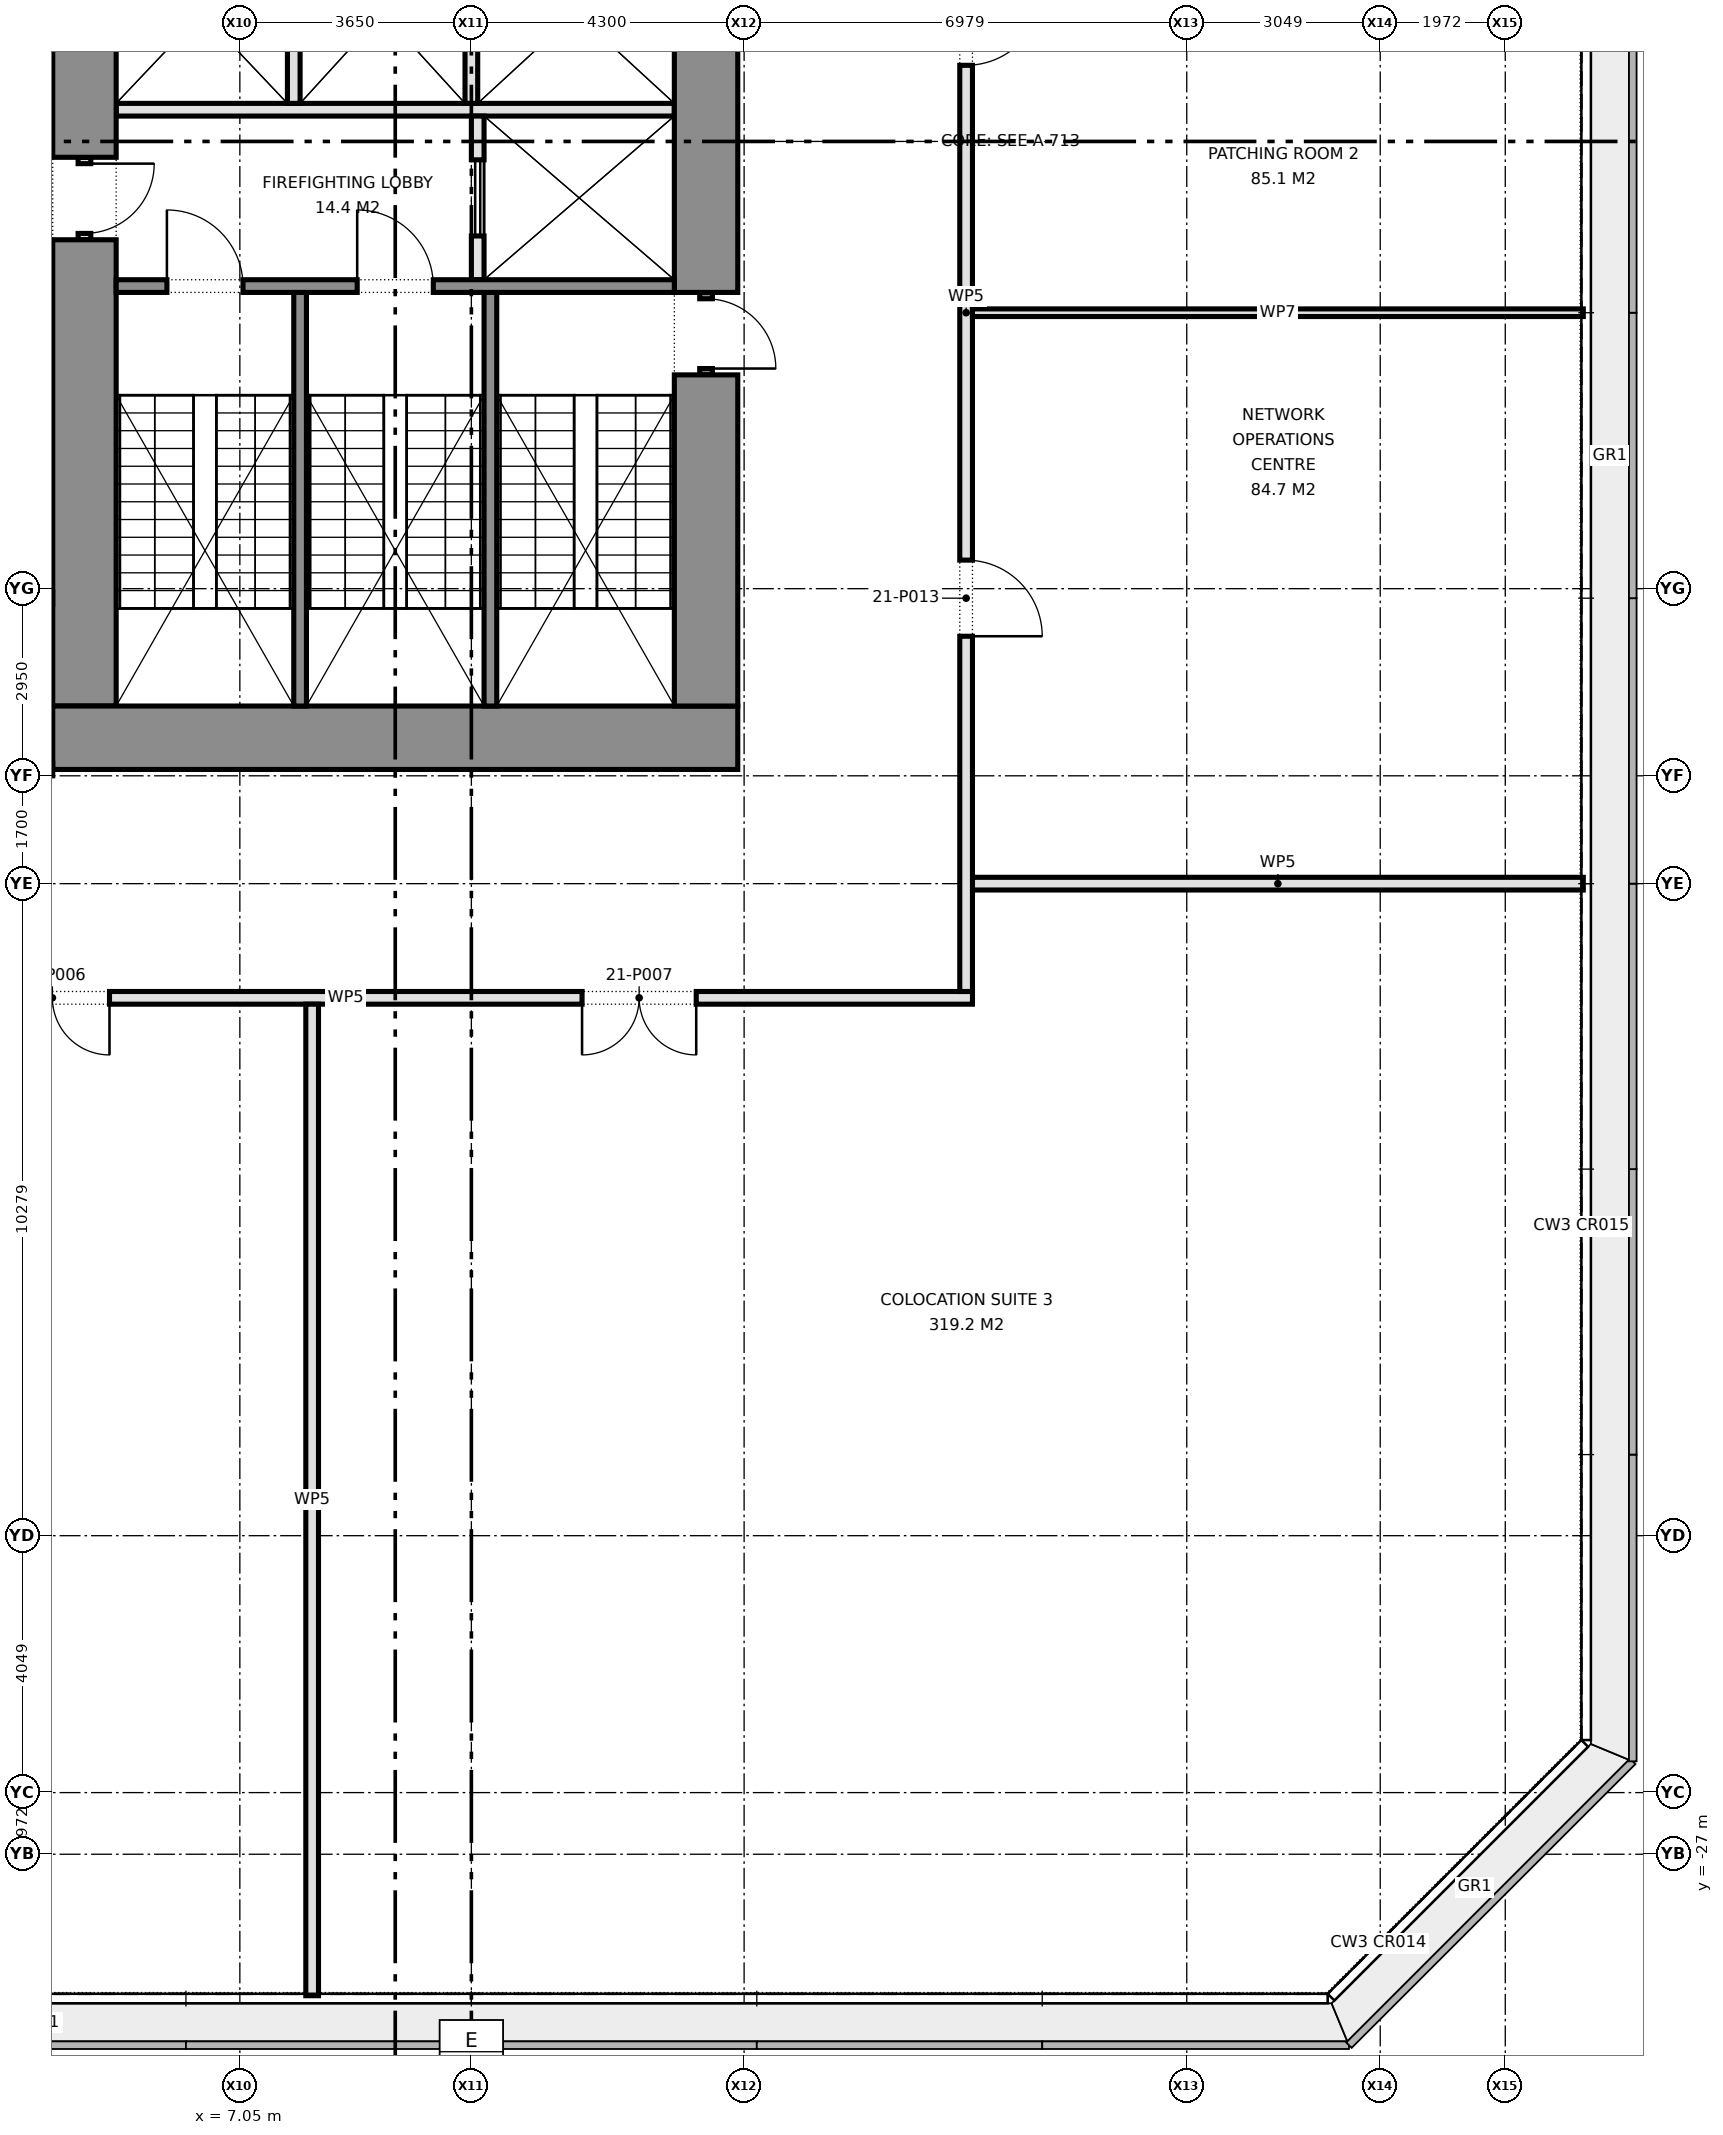
"""IFC4 building model, lengths in metres.
Left out: names, types, materials, properties, quantities, classifications, styles, units other than length and angle.
Written with IfcOpenShell. Run it as: python <this file> out.ifc"""

import sys

from ifc_helpers import new_model, si_unit, direction, frame, frame_2d, origin, place, context, subcontext, project, spatial, rectangle, extrude, element, fill, save


model = new_model("IFC4")
c1 = context("Model", 3, precision=1e-05, world=origin(), true_north=direction((0.0, 1.0)))
c2 = subcontext(c1, "Body", "Model", "MODEL_VIEW")
j1 = project(units=[si_unit("LENGTHUNIT", "METRE"), si_unit("PLANEANGLEUNIT", "RADIAN")], contexts=[c1])
p1 = place(None, origin())
s1 = spatial("IfcSite", under=j1, at=p1, CompositionType="ELEMENT")
p2 = place(p1, origin())
s2 = spatial("IfcBuilding", under=s1, at=p2, CompositionType="ELEMENT")
p3 = place(p2, frame((0.0, 0.0, 95.2)))
s3 = spatial("IfcBuildingStorey", under=s2, at=p3, CompositionType="ELEMENT", Elevation=95.2)
p4 = place(p3, frame((14.9, -9.4, 0.0), z_axis=(0.0, 0.0, 1.0), x_axis=(-1.0, 0.0, 0.0)))
e1 = element("IfcWall", 1, at=p4, inside=s3, PredefinedType="SHEAR", context=c2, shape_type="SweptSolid", body=[
    extrude(rectangle(XDim=10.8, YDim=1.0, at=frame_2d((5.4, 0.0))), origin(), (0.0, 0.0, 1.0), 4.2),
])
p5 = place(p3, frame((14.4, 3.75, 0.0), z_axis=(0.0, 0.0, 1.0), x_axis=(0.0, -1.0, 0.0)))
e2 = element("IfcWall", 2, at=p5, inside=s3, PredefinedType="SHEAR", context=c2, shape_type="SweptSolid", body=[
    extrude(rectangle(XDim=6.13, YDim=1.0, at=frame_2d((3.065, 0.0))), origin(), (0.0, 0.0, 1.0), 4.2),
])
p6 = place(p3, frame((14.4, -2.38, 0.0), z_axis=(0.0, 0.0, 1.0), x_axis=(0.0, -1.0, 0.0)))
e3 = element("IfcWall", 3, at=p6, inside=s3, PredefinedType="SHEAR", context=c2, shape_type="SweptSolid", body=[
    extrude(rectangle(XDim=1.3, YDim=0.2, at=frame_2d((0.65, 0.0))), origin(), (0.0, 0.0, 1.0), 2.4),
])
p7 = place(p6, frame((0.1, 0.0, 0.0)))
e4 = element("IfcOpeningElement", 4, at=p7, cuts=e3, PredefinedType="OPENING", context=c2, shape_type="SweptSolid", body=[
    extrude(rectangle(XDim=1.1, YDim=2.1, at=frame_2d((0.55, 1.05))), frame((0.0, 0.11, 0.0), z_axis=(0.0, -1.0, 0.0), x_axis=(1.0, 0.0, 0.0)), (0.0, 0.0, 1.0), 0.22),
])
p8 = place(p3, frame((14.4, -3.68, 0.0), z_axis=(0.0, 0.0, 1.0), x_axis=(0.0, -1.0, 0.0)))
e5 = element("IfcWall", 5, at=p8, inside=s3, PredefinedType="SHEAR", context=c2, shape_type="SweptSolid", body=[
    extrude(rectangle(XDim=5.22, YDim=1.0, at=frame_2d((2.61, 0.0))), origin(), (0.0, 0.0, 1.0), 4.2),
])
p9 = place(p3, frame((4.6, 3.75, 0.0), z_axis=(0.0, 0.0, 1.0), x_axis=(0.0, -1.0, 0.0)))
e6 = element("IfcWall", 6, at=p9, inside=s3, PredefinedType="SHEAR", context=c2, shape_type="SweptSolid", body=[
    extrude(rectangle(XDim=4.0, YDim=1.0, at=frame_2d((2.0, 0.0))), origin(), (0.0, 0.0, 1.0), 4.2),
])
p10 = place(p3, frame((4.6, -0.25, 0.0), z_axis=(0.0, 0.0, 1.0), x_axis=(0.0, -1.0, 0.0)))
e7 = element("IfcWall", 7, at=p10, inside=s3, PredefinedType="PARTITIONING", context=c2, shape_type="SweptSolid", body=[
    extrude(rectangle(XDim=1.3, YDim=0.2, at=frame_2d((0.65, 0.0))), origin(), (0.0, 0.0, 1.0), 2.4),
])
p11 = place(p10, frame((0.1, 0.0, 0.0)))
e8 = element("IfcOpeningElement", 8, at=p11, cuts=e7, PredefinedType="OPENING", context=c2, shape_type="SweptSolid", body=[
    extrude(rectangle(XDim=1.1, YDim=2.1, at=frame_2d((0.55, 1.05))), frame((0.0, 0.11, 0.0), z_axis=(0.0, -1.0, 0.0), x_axis=(1.0, 0.0, 0.0)), (0.0, 0.0, 1.0), 0.22),
])
p12 = place(p3, frame((4.6, -1.55, 0.0), z_axis=(0.0, 0.0, 1.0), x_axis=(0.0, -1.0, 0.0)))
e9 = element("IfcWall", 9, at=p12, inside=s3, PredefinedType="SHEAR", context=c2, shape_type="SweptSolid", body=[
    extrude(rectangle(XDim=7.35, YDim=1.0, at=frame_2d((3.675, 0.0))), origin(), (0.0, 0.0, 1.0), 4.2),
])
p13 = place(p3, frame((13.9, 0.5, 0.0), z_axis=(0.0, 0.0, 1.0), x_axis=(-1.0, 0.0, 0.0)))
e10 = element("IfcWall", 10, at=p13, inside=s3, PredefinedType="PARTITIONING", context=c2, shape_type="SweptSolid", body=[
    extrude(rectangle(XDim=8.8, YDim=0.2, at=frame_2d((4.4, 0.0))), origin(), (0.0, 0.0, 1.0), 4.2),
])
p14 = place(p3, frame((10.8, 0.4, 0.0), z_axis=(0.0, 0.0, 1.0), x_axis=(0.0, -1.0, 0.0)))
e11 = element("IfcWall", 11, at=p14, inside=s3, PredefinedType="PARTITIONING", context=c2, shape_type="SweptSolid", body=[
    extrude(rectangle(XDim=2.58, YDim=0.2, at=frame_2d((1.29, 0.0))), origin(), (0.0, 0.0, 1.0), 4.2),
])
p15 = place(p14, frame((0.69, 0.0, 0.0)))
e12 = element("IfcOpeningElement", 12, at=p15, cuts=e11, PredefinedType="OPENING", context=c2, shape_type="SweptSolid", body=[
    extrude(rectangle(XDim=1.2, YDim=2.1, at=frame_2d((0.6, 1.05))), frame((0.0, 0.11, 0.0), z_axis=(0.0, -1.0, 0.0), x_axis=(1.0, 0.0, 0.0)), (0.0, 0.0, 1.0), 0.22),
])
p16 = place(p3, frame((13.9, -2.28, 0.0), z_axis=(0.0, 0.0, 1.0), x_axis=(-1.0, 0.0, 0.0)))
e13 = element("IfcWall", 13, at=p16, inside=s3, PredefinedType="SHEAR", context=c2, shape_type="SweptSolid", body=[
    extrude(rectangle(XDim=8.8, YDim=0.2, at=frame_2d((4.4, 0.0))), origin(), (0.0, 0.0, 1.0), 4.2),
])
p17 = place(p16, frame((3.8, 0.0, 0.0)))
e14 = element("IfcOpeningElement", 14, at=p17, cuts=e13, PredefinedType="OPENING", context=c2, shape_type="SweptSolid", body=[
    extrude(rectangle(XDim=1.2, YDim=2.1, at=frame_2d((0.6, 1.05))), frame((0.0, 0.11, 0.0), z_axis=(0.0, -1.0, 0.0), x_axis=(1.0, 0.0, 0.0)), (0.0, 0.0, 1.0), 0.22),
])
p18 = place(p16, frame((6.8, 0.0, 0.0)))
e15 = element("IfcOpeningElement", 15, at=p18, cuts=e13, PredefinedType="OPENING", context=c2, shape_type="SweptSolid", body=[
    extrude(rectangle(XDim=1.2, YDim=2.1, at=frame_2d((0.6, 1.05))), frame((0.0, 0.11, 0.0), z_axis=(0.0, -1.0, 0.0), x_axis=(1.0, 0.0, 0.0)), (0.0, 0.0, 1.0), 0.22),
])
for number, where, z_axis, x_axis in (
    (16, (11.0, -2.38, 0.0), (0.0, 0.0, 1.0), (0.0, -1.0, 0.0)),
    (17, (8.0, -2.38, 0.0), (0.0, 0.0, 1.0), (0.0, -1.0, 0.0)),
):
    element("IfcWall", number, at=place(p3, frame(where, z_axis=z_axis, x_axis=x_axis)), inside=s3, PredefinedType="SHEAR", context=c2, shape_type="SweptSolid", body=[
        extrude(rectangle(XDim=6.52, YDim=0.2, at=frame_2d((3.26, 0.0))), origin(), (0.0, 0.0, 1.0), 4.2),
    ])
for number, where, z_axis, x_axis in (
    (18, (10.7, 3.45, 0.0), (0.0, 0.0, 1.0), (0.0, -1.0, 0.0)),
    (19, (7.9, 3.45, 0.0), (0.0, 0.0, 1.0), (0.0, -1.0, 0.0)),
):
    element("IfcWall", number, at=place(p3, frame(where, z_axis=z_axis, x_axis=x_axis)), inside=s3, PredefinedType="PARTITIONING", context=c2, shape_type="SweptSolid", body=[
        extrude(rectangle(XDim=2.85, YDim=0.2, at=frame_2d((1.425, 0.0))), origin(), (0.0, 0.0, 1.0), 4.2),
    ])
p19 = place(p3, frame((-18.6, -13.5, 0.0), z_axis=(0.0, 0.0, 1.0), x_axis=(1.0, 0.0, 0.0)))
e20 = element("IfcWall", 20, at=p19, inside=s3, PredefinedType="PARTITIONING", context=c2, shape_type="SweptSolid", body=[
    extrude(rectangle(XDim=37.2, YDim=0.2, at=frame_2d((18.6, 0.0))), origin(), (0.0, 0.0, 1.0), 4.2),
])
p20 = place(p19, frame((2.55, 0.0, 0.0)))
e21 = element("IfcOpeningElement", 21, at=p20, cuts=e20, PredefinedType="OPENING", context=c2, shape_type="SweptSolid", body=[
    extrude(rectangle(XDim=1.8, YDim=2.1, at=frame_2d((0.9, 1.05))), frame((0.0, 0.11, 0.0), z_axis=(0.0, -1.0, 0.0), x_axis=(1.0, 0.0, 0.0)), (0.0, 0.0, 1.0), 0.22),
])
p21 = place(p19, frame((21.795, 0.0, 0.0)))
e22 = element("IfcOpeningElement", 22, at=p21, cuts=e20, PredefinedType="OPENING", context=c2, shape_type="SweptSolid", body=[
    extrude(rectangle(XDim=1.8, YDim=2.1, at=frame_2d((0.9, 1.05))), frame((0.0, 0.11, 0.0), z_axis=(0.0, -1.0, 0.0), x_axis=(1.0, 0.0, 0.0)), (0.0, 0.0, 1.0), 0.22),
])
p22 = place(p19, frame((31.045, 0.0, 0.0)))
e23 = element("IfcOpeningElement", 23, at=p22, cuts=e20, PredefinedType="OPENING", context=c2, shape_type="SweptSolid", body=[
    extrude(rectangle(XDim=1.8, YDim=2.1, at=frame_2d((0.9, 1.05))), frame((0.0, 0.11, 0.0), z_axis=(0.0, -1.0, 0.0), x_axis=(1.0, 0.0, 0.0)), (0.0, 0.0, 1.0), 0.22),
])
p23 = place(p19, frame((8.0, 0.0, 0.0)))
e24 = element("IfcOpeningElement", 24, at=p23, cuts=e20, PredefinedType="OPENING", context=c2, shape_type="SweptSolid", body=[
    extrude(rectangle(XDim=1.2, YDim=2.1, at=frame_2d((0.6, 1.05))), frame((0.0, 0.11, 0.0), z_axis=(0.0, -1.0, 0.0), x_axis=(1.0, 0.0, 0.0)), (0.0, 0.0, 1.0), 0.22),
])
p24 = place(p19, frame((11.4, 0.0, 0.0)))
e25 = element("IfcOpeningElement", 25, at=p24, cuts=e20, PredefinedType="OPENING", context=c2, shape_type="SweptSolid", body=[
    extrude(rectangle(XDim=1.0, YDim=2.1, at=frame_2d((0.5, 1.05))), frame((0.0, 0.11, 0.0), z_axis=(0.0, -1.0, 0.0), x_axis=(1.0, 0.0, 0.0)), (0.0, 0.0, 1.0), 0.22),
])
p25 = place(p19, frame((14.4, 0.0, 0.0)))
e26 = element("IfcOpeningElement", 26, at=p25, cuts=e20, PredefinedType="OPENING", context=c2, shape_type="SweptSolid", body=[
    extrude(rectangle(XDim=1.0, YDim=2.1, at=frame_2d((0.5, 1.05))), frame((0.0, 0.11, 0.0), z_axis=(0.0, -1.0, 0.0), x_axis=(1.0, 0.0, 0.0)), (0.0, 0.0, 1.0), 0.22),
])
p26 = place(p19, frame((17.0, 0.0, 0.0)))
e27 = element("IfcOpeningElement", 27, at=p26, cuts=e20, PredefinedType="OPENING", context=c2, shape_type="SweptSolid", body=[
    extrude(rectangle(XDim=1.0, YDim=2.1, at=frame_2d((0.5, 1.05))), frame((0.0, 0.11, 0.0), z_axis=(0.0, -1.0, 0.0), x_axis=(1.0, 0.0, 0.0)), (0.0, 0.0, 1.0), 0.22),
])
p27 = place(p3, frame((18.6, -11.7, 0.0), z_axis=(0.0, 0.0, 1.0), x_axis=(1.0, 0.0, 0.0)))
e28 = element("IfcWall", 28, at=p27, inside=s3, PredefinedType="PARTITIONING", context=c2, shape_type="SweptSolid", body=[
    extrude(rectangle(XDim=9.63, YDim=0.2, at=frame_2d((4.815, 0.0))), origin(), (0.0, 0.0, 1.0), 4.2),
])
p28 = place(p3, frame((18.5, -13.4, 0.0), z_axis=(0.0, 0.0, 1.0), x_axis=(0.0, 1.0, 0.0)))
e29 = element("IfcWall", 29, at=p28, inside=s3, PredefinedType="PARTITIONING", context=c2, shape_type="SweptSolid", body=[
    extrude(rectangle(XDim=26.8, YDim=0.2, at=frame_2d((13.4, 0.0))), origin(), (0.0, 0.0, 1.0), 4.2),
])
p29 = place(p28, frame((5.6, 0.0, 0.0)))
e30 = element("IfcOpeningElement", 30, at=p29, cuts=e29, PredefinedType="OPENING", context=c2, shape_type="SweptSolid", body=[
    extrude(rectangle(XDim=1.2, YDim=2.1, at=frame_2d((0.6, 1.05))), frame((0.0, 0.11, 0.0), z_axis=(0.0, -1.0, 0.0), x_axis=(1.0, 0.0, 0.0)), (0.0, 0.0, 1.0), 0.22),
])
p30 = place(p28, frame((14.6, 0.0, 0.0)))
e31 = element("IfcOpeningElement", 31, at=p30, cuts=e29, PredefinedType="OPENING", context=c2, shape_type="SweptSolid", body=[
    extrude(rectangle(XDim=1.2, YDim=2.1, at=frame_2d((0.6, 1.05))), frame((0.0, 0.11, 0.0), z_axis=(0.0, -1.0, 0.0), x_axis=(1.0, 0.0, 0.0)), (0.0, 0.0, 1.0), 0.22),
])
p31 = place(p28, frame((21.05, 0.0, 0.0)))
e32 = element("IfcOpeningElement", 32, at=p31, cuts=e29, PredefinedType="OPENING", context=c2, shape_type="SweptSolid", body=[
    extrude(rectangle(XDim=1.8, YDim=2.1, at=frame_2d((0.9, 1.05))), frame((0.0, 0.11, 0.0), z_axis=(0.0, -1.0, 0.0), x_axis=(1.0, 0.0, 0.0)), (0.0, 0.0, 1.0), 0.22),
])
p32 = place(p3, frame((8.19, -29.23, 0.0), z_axis=(0.0, 0.0, 1.0), x_axis=(0.0, 1.0, 0.0)))
e33 = element("IfcWall", 33, at=p32, inside=s3, PredefinedType="PARTITIONING", context=c2, shape_type="SweptSolid", body=[
    extrude(rectangle(XDim=15.63, YDim=0.2, at=frame_2d((7.815, 0.0))), origin(), (0.0, 0.0, 1.0), 4.2),
])
p33 = place(p3, frame((18.6, -2.7, 0.0), z_axis=(0.0, 0.0, 1.0), x_axis=(1.0, 0.0, 0.0)))
e34 = element("IfcWall", 34, at=p33, inside=s3, PredefinedType="PARTITIONING", context=c2, shape_type="SweptSolid", body=[
    extrude(rectangle(XDim=9.63, YDim=0.12, at=frame_2d((4.815, 0.0))), origin(), (0.0, 0.0, 1.0), 4.2),
])
p34 = place(p7, origin())
e35 = element("IfcDoor", 35, at=p34, inside=s3, OperationType="SINGLE_SWING_RIGHT", PredefinedType="DOOR", context=c2, shape_type="SweptSolid", body=[
    extrude(rectangle(XDim=1.1, YDim=2.1, at=frame_2d((0.55, 1.05))), frame((0.0, 0.025, 0.0), z_axis=(0.0, -1.0, 0.0), x_axis=(1.0, 0.0, 0.0)), (0.0, 0.0, 1.0), 0.05),
])
fill(e4, e35)
p35 = place(p11, origin())
e36 = element("IfcDoor", 36, at=p35, inside=s3, OperationType="SINGLE_SWING_LEFT", PredefinedType="DOOR", context=c2, shape_type="SweptSolid", body=[
    extrude(rectangle(XDim=1.1, YDim=2.1, at=frame_2d((0.55, 1.05))), frame((0.0, 0.025, 0.0), z_axis=(0.0, -1.0, 0.0), x_axis=(1.0, 0.0, 0.0)), (0.0, 0.0, 1.0), 0.05),
])
fill(e8, e36)
p36 = place(p15, origin())
e37 = element("IfcDoor", 37, at=p36, inside=s3, OperationType="DOUBLE_DOOR_SLIDING", PredefinedType="DOOR", context=c2, shape_type="SweptSolid", body=[
    extrude(rectangle(XDim=1.2, YDim=2.1, at=frame_2d((0.6, 1.05))), frame((0.0, 0.025, 0.0), z_axis=(0.0, -1.0, 0.0), x_axis=(1.0, 0.0, 0.0)), (0.0, 0.0, 1.0), 0.05),
])
fill(e12, e37)
p37 = place(p17, frame((1.2, 0.0, 0.0), z_axis=(0.0, 0.0, 1.0), x_axis=(-1.0, 0.0, 0.0)))
e38 = element("IfcDoor", 38, at=p37, inside=s3, OperationType="SINGLE_SWING_LEFT", PredefinedType="DOOR", context=c2, shape_type="SweptSolid", body=[
    extrude(rectangle(XDim=1.2, YDim=2.1, at=frame_2d((0.6, 1.05))), frame((0.0, 0.025, 0.0), z_axis=(0.0, -1.0, 0.0), x_axis=(1.0, 0.0, 0.0)), (0.0, 0.0, 1.0), 0.05),
])
fill(e14, e38)
p38 = place(p18, frame((1.2, 0.0, 0.0), z_axis=(0.0, 0.0, 1.0), x_axis=(-1.0, 0.0, 0.0)))
e39 = element("IfcDoor", 39, at=p38, inside=s3, OperationType="SINGLE_SWING_LEFT", PredefinedType="DOOR", context=c2, shape_type="SweptSolid", body=[
    extrude(rectangle(XDim=1.2, YDim=2.1, at=frame_2d((0.6, 1.05))), frame((0.0, 0.025, 0.0), z_axis=(0.0, -1.0, 0.0), x_axis=(1.0, 0.0, 0.0)), (0.0, 0.0, 1.0), 0.05),
])
fill(e15, e39)
p39 = place(p21, frame((1.8, 0.0, 0.0), z_axis=(0.0, 0.0, 1.0), x_axis=(-1.0, 0.0, 0.0)))
e40 = element("IfcDoor", 40, at=p39, inside=s3, OperationType="DOUBLE_DOOR_SINGLE_SWING", PredefinedType="DOOR", context=c2, shape_type="SweptSolid", body=[
    extrude(rectangle(XDim=1.8, YDim=2.1, at=frame_2d((0.9, 1.05))), frame((0.0, 0.025, 0.0), z_axis=(0.0, -1.0, 0.0), x_axis=(1.0, 0.0, 0.0)), (0.0, 0.0, 1.0), 0.05),
])
fill(e22, e40)
p40 = place(p22, frame((1.8, 0.0, 0.0), z_axis=(0.0, 0.0, 1.0), x_axis=(-1.0, 0.0, 0.0)))
e41 = element("IfcDoor", 41, at=p40, inside=s3, OperationType="DOUBLE_DOOR_SINGLE_SWING", PredefinedType="DOOR", context=c2, shape_type="SweptSolid", body=[
    extrude(rectangle(XDim=1.8, YDim=2.1, at=frame_2d((0.9, 1.05))), frame((0.0, 0.025, 0.0), z_axis=(0.0, -1.0, 0.0), x_axis=(1.0, 0.0, 0.0)), (0.0, 0.0, 1.0), 0.05),
])
fill(e23, e41)
p41 = place(p29, frame((1.2, 0.0, 0.0), z_axis=(0.0, 0.0, 1.0), x_axis=(-1.0, 0.0, 0.0)))
e42 = element("IfcDoor", 42, at=p41, inside=s3, OperationType="SINGLE_SWING_RIGHT", PredefinedType="DOOR", context=c2, shape_type="SweptSolid", body=[
    extrude(rectangle(XDim=1.2, YDim=2.1, at=frame_2d((0.6, 1.05))), frame((0.0, 0.025, 0.0), z_axis=(0.0, -1.0, 0.0), x_axis=(1.0, 0.0, 0.0)), (0.0, 0.0, 1.0), 0.05),
])
fill(e30, e42)
p42 = place(p30, frame((1.2, 0.0, 0.0), z_axis=(0.0, 0.0, 1.0), x_axis=(-1.0, 0.0, 0.0)))
e43 = element("IfcDoor", 43, at=p42, inside=s3, OperationType="SINGLE_SWING_LEFT", PredefinedType="DOOR", context=c2, shape_type="SweptSolid", body=[
    extrude(rectangle(XDim=1.2, YDim=2.1, at=frame_2d((0.6, 1.05))), frame((0.0, 0.025, 0.0), z_axis=(0.0, -1.0, 0.0), x_axis=(1.0, 0.0, 0.0)), (0.0, 0.0, 1.0), 0.05),
])
fill(e31, e43)
save(model, sys.argv[1])
